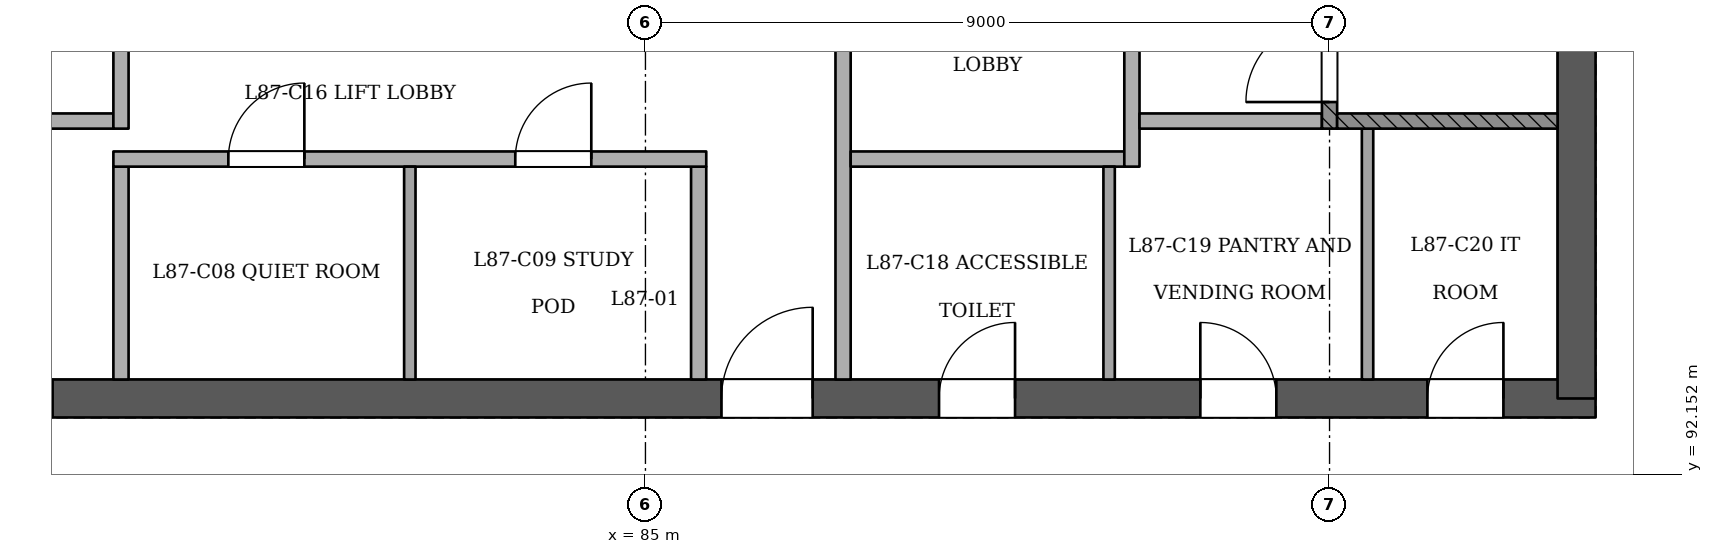
"""IFC4 building model, lengths in metres.
Left out: names, types, materials, properties, quantities, classifications, styles, units other than length and angle.
Written with IfcOpenShell. Run it as: python <this file> out.ifc"""

import sys

from ifc_helpers import new_model, si_unit, direction, frame, frame_2d, origin, place, context, subcontext, project, spatial, rectangle, extrude, element, fill, save


model = new_model("IFC4")
c1 = context("Model", 3, precision=1e-05, world=origin(), true_north=direction((0.0, 1.0)))
c2 = subcontext(c1, "Body", "Model", "MODEL_VIEW")
j1 = project(units=[si_unit("LENGTHUNIT", "METRE"), si_unit("PLANEANGLEUNIT", "RADIAN")], contexts=[c1])
p1 = place(None, origin())
s1 = spatial("IfcSite", under=j1, at=p1, CompositionType="ELEMENT")
p2 = place(p1, origin())
s2 = spatial("IfcBuilding", under=s1, at=p2, CompositionType="ELEMENT")
p3 = place(p2, frame((0.0, 0.0, 334.6)))
s3 = spatial("IfcBuildingStorey", under=s2, at=p3, CompositionType="ELEMENT", Elevation=334.6)
p4 = place(p3, frame((72.75, 93.15, 0.0), z_axis=(0.0, 0.0, 1.0), x_axis=(1.0, 0.0, 0.0)))
e1 = element("IfcWall", 1, at=p4, inside=s3, PredefinedType="SHEAR", context=c2, shape_type="SweptSolid", body=[
    extrude(rectangle(XDim=24.75, YDim=0.5, at=frame_2d((12.375, 0.0))), origin(), (0.0, 0.0, 1.0), 4.2),
])
p5 = place(p4, frame((1.05, 0.0, 0.0)))
e2 = element("IfcOpeningElement", 2, at=p5, cuts=e1, PredefinedType="OPENING", context=c2, shape_type="SweptSolid", body=[
    extrude(rectangle(XDim=1.2, YDim=2.1, at=frame_2d((0.6, 1.05))), frame((0.0, 0.26, 0.0), z_axis=(0.0, -1.0, 0.0), x_axis=(1.0, 0.0, 0.0)), (0.0, 0.0, 1.0), 0.521),
])
p6 = place(p4, frame((3.25, 0.0, 0.0)))
e3 = element("IfcOpeningElement", 3, at=p6, cuts=e1, PredefinedType="OPENING", context=c2, shape_type="SweptSolid", body=[
    extrude(rectangle(XDim=1.2, YDim=2.1, at=frame_2d((0.6, 1.05))), frame((0.0, 0.26, 0.0), z_axis=(0.0, -1.0, 0.0), x_axis=(1.0, 0.0, 0.0)), (0.0, 0.0, 1.0), 0.521),
])
p7 = place(p4, frame((13.25, 0.0, 0.0)))
e4 = element("IfcOpeningElement", 4, at=p7, cuts=e1, PredefinedType="OPENING", context=c2, shape_type="SweptSolid", body=[
    extrude(rectangle(XDim=1.2, YDim=2.1, at=frame_2d((0.6, 1.05))), frame((0.0, 0.26, 0.0), z_axis=(0.0, -1.0, 0.0), x_axis=(1.0, 0.0, 0.0)), (0.0, 0.0, 1.0), 0.521),
])
p8 = place(p4, frame((16.113, 0.0, 0.0)))
e5 = element("IfcOpeningElement", 5, at=p8, cuts=e1, PredefinedType="OPENING", context=c2, shape_type="SweptSolid", body=[
    extrude(rectangle(XDim=1.0, YDim=2.1, at=frame_2d((0.5, 1.05))), frame((0.0, 0.26, 0.0), z_axis=(0.0, -1.0, 0.0), x_axis=(1.0, 0.0, 0.0)), (0.0, 0.0, 1.0), 0.521),
])
p9 = place(p4, frame((19.55, 0.0, 0.0)))
e6 = element("IfcOpeningElement", 6, at=p9, cuts=e1, PredefinedType="OPENING", context=c2, shape_type="SweptSolid", body=[
    extrude(rectangle(XDim=1.0, YDim=2.1, at=frame_2d((0.5, 1.05))), frame((0.0, 0.26, 0.0), z_axis=(0.0, -1.0, 0.0), x_axis=(1.0, 0.0, 0.0)), (0.0, 0.0, 1.0), 0.521),
])
p10 = place(p4, frame((22.538, 0.0, 0.0)))
e7 = element("IfcOpeningElement", 7, at=p10, cuts=e1, PredefinedType="OPENING", context=c2, shape_type="SweptSolid", body=[
    extrude(rectangle(XDim=1.0, YDim=2.1, at=frame_2d((0.5, 1.05))), frame((0.0, 0.26, 0.0), z_axis=(0.0, -1.0, 0.0), x_axis=(1.0, 0.0, 0.0)), (0.0, 0.0, 1.0), 0.521),
])
p11 = place(p3, frame((97.25, 93.15, 0.0), z_axis=(0.0, 0.0, 1.0), x_axis=(0.0, 1.0, 0.0)))
e8 = element("IfcWall", 8, at=p11, inside=s3, PredefinedType="SHEAR", context=c2, shape_type="SweptSolid", body=[
    extrude(rectangle(XDim=10.75, YDim=0.5, at=frame_2d((5.375, 0.0))), origin(), (0.0, 0.0, 1.0), 4.2),
])
p12 = place(p3, frame((78.1, 93.4, 0.0), z_axis=(0.0, 0.0, 1.0), x_axis=(0.0, 1.0, 0.0)))
e9 = element("IfcWall", 9, at=p12, inside=s3, PredefinedType="PARTITIONING", context=c2, shape_type="SweptSolid", body=[
    extrude(rectangle(XDim=2.8, YDim=0.2, at=frame_2d((1.4, 0.0))), origin(), (0.0, 0.0, 1.0), 3.9),
])
p13 = place(p3, frame((81.9, 93.4, 0.0), z_axis=(0.0, 0.0, 1.0), x_axis=(0.0, 1.0, 0.0)))
e10 = element("IfcWall", 10, at=p13, inside=s3, PredefinedType="PARTITIONING", context=c2, shape_type="SweptSolid", body=[
    extrude(rectangle(XDim=2.8, YDim=0.15, at=frame_2d((1.4, 0.0))), origin(), (0.0, 0.0, 1.0), 3.9),
])
p14 = place(p3, frame((85.7, 93.4, 0.0), z_axis=(0.0, 0.0, 1.0), x_axis=(0.0, 1.0, 0.0)))
e11 = element("IfcWall", 11, at=p14, inside=s3, PredefinedType="PARTITIONING", context=c2, shape_type="SweptSolid", body=[
    extrude(rectangle(XDim=2.8, YDim=0.2, at=frame_2d((1.4, 0.0))), origin(), (0.0, 0.0, 1.0), 3.9),
])
p15 = place(p3, frame((87.6, 93.4, 0.0), z_axis=(0.0, 0.0, 1.0), x_axis=(0.0, 1.0, 0.0)))
e12 = element("IfcWall", 12, at=p15, inside=s3, PredefinedType="PARTITIONING", context=c2, shape_type="SweptSolid", body=[
    extrude(rectangle(XDim=7.0, YDim=0.2, at=frame_2d((3.5, 0.0))), origin(), (0.0, 0.0, 1.0), 3.9),
])
p16 = place(p15, frame((4.45, 0.0, 0.0)))
e13 = element("IfcOpeningElement", 13, at=p16, cuts=e12, PredefinedType="OPENING", context=c2, shape_type="SweptSolid", body=[
    extrude(rectangle(XDim=1.1, YDim=2.1, at=frame_2d((0.55, 1.05))), frame((0.0, 0.11, 0.0), z_axis=(0.0, -1.0, 0.0), x_axis=(1.0, 0.0, 0.0)), (0.0, 0.0, 1.0), 0.221),
])
p17 = place(p3, frame((91.1, 93.4, 0.0), z_axis=(0.0, 0.0, 1.0), x_axis=(0.0, 1.0, 0.0)))
e14 = element("IfcWall", 14, at=p17, inside=s3, PredefinedType="PARTITIONING", context=c2, shape_type="SweptSolid", body=[
    extrude(rectangle(XDim=2.8, YDim=0.15, at=frame_2d((1.4, 0.0))), origin(), (0.0, 0.0, 1.0), 3.9),
])
p18 = place(p3, frame((94.5, 93.4, 0.0), z_axis=(0.0, 0.0, 1.0), x_axis=(0.0, 1.0, 0.0)))
e15 = element("IfcWall", 15, at=p18, inside=s3, PredefinedType="PARTITIONING", context=c2, shape_type="SweptSolid", body=[
    extrude(rectangle(XDim=3.3, YDim=0.15, at=frame_2d((1.65, 0.0))), origin(), (0.0, 0.0, 1.0), 3.9),
])
p19 = place(p3, frame((78.0, 96.3, 0.0), z_axis=(0.0, 0.0, 1.0), x_axis=(1.0, 0.0, 0.0)))
e16 = element("IfcWall", 16, at=p19, inside=s3, PredefinedType="PARTITIONING", context=c2, shape_type="SweptSolid", body=[
    extrude(rectangle(XDim=7.8, YDim=0.2, at=frame_2d((3.9, 0.0))), origin(), (0.0, 0.0, 1.0), 3.9),
])
p20 = place(p19, frame((1.512, 0.0, 0.0)))
e17 = element("IfcOpeningElement", 17, at=p20, cuts=e16, PredefinedType="OPENING", context=c2, shape_type="SweptSolid", body=[
    extrude(rectangle(XDim=1.0, YDim=2.1, at=frame_2d((0.5, 1.05))), frame((0.0, 0.11, 0.0), z_axis=(0.0, -1.0, 0.0), x_axis=(1.0, 0.0, 0.0)), (0.0, 0.0, 1.0), 0.221),
])
p21 = place(p19, frame((5.288, 0.0, 0.0)))
e18 = element("IfcOpeningElement", 18, at=p21, cuts=e16, PredefinedType="OPENING", context=c2, shape_type="SweptSolid", body=[
    extrude(rectangle(XDim=1.0, YDim=2.1, at=frame_2d((0.5, 1.05))), frame((0.0, 0.11, 0.0), z_axis=(0.0, -1.0, 0.0), x_axis=(1.0, 0.0, 0.0)), (0.0, 0.0, 1.0), 0.221),
])
p22 = place(p3, frame((87.7, 96.3, 0.0), z_axis=(0.0, 0.0, 1.0), x_axis=(1.0, 0.0, 0.0)))
e19 = element("IfcWall", 19, at=p22, inside=s3, PredefinedType="PARTITIONING", context=c2, shape_type="SweptSolid", body=[
    extrude(rectangle(XDim=3.6, YDim=0.2, at=frame_2d((1.8, 0.0))), origin(), (0.0, 0.0, 1.0), 3.9),
])
p23 = place(p3, frame((91.4, 96.2, 0.0), z_axis=(0.0, 0.0, 1.0), x_axis=(0.0, 1.0, 0.0)))
e20 = element("IfcWall", 20, at=p23, inside=s3, PredefinedType="PARTITIONING", context=c2, shape_type="SweptSolid", body=[
    extrude(rectangle(XDim=4.2, YDim=0.2, at=frame_2d((2.1, 0.0))), origin(), (0.0, 0.0, 1.0), 3.9),
])
p24 = place(p23, frame((2.45, 0.0, 0.0)))
e21 = element("IfcOpeningElement", 21, at=p24, cuts=e20, PredefinedType="OPENING", context=c2, shape_type="SweptSolid", body=[
    extrude(rectangle(XDim=1.1, YDim=2.1, at=frame_2d((0.55, 1.05))), frame((0.0, 0.11, 0.0), z_axis=(0.0, -1.0, 0.0), x_axis=(1.0, 0.0, 0.0)), (0.0, 0.0, 1.0), 0.221),
])
p25 = place(p3, frame((76.1, 96.8, 0.0), z_axis=(0.0, 0.0, 1.0), x_axis=(1.0, 0.0, 0.0)))
e22 = element("IfcWall", 22, at=p25, inside=s3, PredefinedType="PARTITIONING", context=c2, shape_type="SweptSolid", body=[
    extrude(rectangle(XDim=1.9, YDim=0.2, at=frame_2d((0.95, 0.0))), origin(), (0.0, 0.0, 1.0), 3.9),
])
p26 = place(p3, frame((78.1, 96.7, 0.0), z_axis=(0.0, 0.0, 1.0), x_axis=(0.0, 1.0, 0.0)))
e23 = element("IfcWall", 23, at=p26, inside=s3, PredefinedType="PARTITIONING", context=c2, shape_type="SweptSolid", body=[
    extrude(rectangle(XDim=3.7, YDim=0.2, at=frame_2d((1.85, 0.0))), origin(), (0.0, 0.0, 1.0), 3.9),
])
p27 = place(p26, frame((1.95, 0.0, 0.0)))
e24 = element("IfcOpeningElement", 24, at=p27, cuts=e23, PredefinedType="OPENING", context=c2, shape_type="SweptSolid", body=[
    extrude(rectangle(XDim=1.1, YDim=2.1, at=frame_2d((0.55, 1.05))), frame((0.0, 0.11, 0.0), z_axis=(0.0, -1.0, 0.0), x_axis=(1.0, 0.0, 0.0)), (0.0, 0.0, 1.0), 0.221),
])
p28 = place(p3, frame((91.5, 96.8, 0.0), z_axis=(0.0, 0.0, 1.0), x_axis=(1.0, 0.0, 0.0)))
e25 = element("IfcWall", 25, at=p28, inside=s3, PredefinedType="PARTITIONING", context=c2, shape_type="SweptSolid", body=[
    extrude(rectangle(XDim=2.4, YDim=0.2, at=frame_2d((1.2, 0.0))), origin(), (0.0, 0.0, 1.0), 3.9),
])
p29 = place(p3, frame((94.0, 96.7, 0.0), z_axis=(0.0, 0.0, 1.0), x_axis=(0.0, 1.0, 0.0)))
e26 = element("IfcWall", 26, at=p29, inside=s3, PredefinedType="SOLIDWALL", context=c2, shape_type="SweptSolid", body=[
    extrude(rectangle(XDim=3.7, YDim=0.2, at=frame_2d((1.85, 0.0))), origin(), (0.0, 0.0, 1.0), 3.9),
])
p30 = place(p29, frame((0.35, 0.0, 0.0)))
e27 = element("IfcOpeningElement", 27, at=p30, cuts=e26, PredefinedType="OPENING", context=c2, shape_type="SweptSolid", body=[
    extrude(rectangle(XDim=1.1, YDim=2.1, at=frame_2d((0.55, 1.05))), frame((0.0, 0.11, 0.0), z_axis=(0.0, -1.0, 0.0), x_axis=(1.0, 0.0, 0.0)), (0.0, 0.0, 1.0), 0.221),
])
p31 = place(p3, frame((94.1, 96.8, 0.0), z_axis=(0.0, 0.0, 1.0), x_axis=(1.0, 0.0, 0.0)))
e28 = element("IfcWall", 28, at=p31, inside=s3, PredefinedType="SOLIDWALL", context=c2, shape_type="SweptSolid", body=[
    extrude(rectangle(XDim=2.9, YDim=0.2, at=frame_2d((1.45, 0.0))), origin(), (0.0, 0.0, 1.0), 3.9),
])
p32 = place(p30, origin())
e29 = element("IfcDoor", 29, at=p32, inside=s3, OperationType="SINGLE_SWING_LEFT", PredefinedType="NOTDEFINED", context=c2, shape_type="SweptSolid", body=[
    extrude(rectangle(XDim=1.1, YDim=2.1, at=frame_2d((0.55, 1.05))), frame((0.0, 0.025, 0.0), z_axis=(0.0, -1.0, 0.0), x_axis=(1.0, 0.0, 0.0)), (0.0, 0.0, 1.0), 0.05),
])
fill(e27, e29)
p33 = place(p6, origin())
e30 = element("IfcDoor", 30, at=p33, inside=s3, OperationType="SINGLE_SWING_LEFT", PredefinedType="NOTDEFINED", context=c2, shape_type="SweptSolid", body=[
    extrude(rectangle(XDim=1.2, YDim=2.1, at=frame_2d((0.6, 1.05))), frame((0.0, 0.025, 0.0), z_axis=(0.0, -1.0, 0.0), x_axis=(1.0, 0.0, 0.0)), (0.0, 0.0, 1.0), 0.05),
])
fill(e3, e30)
p34 = place(p7, origin())
e31 = element("IfcDoor", 31, at=p34, inside=s3, OperationType="SINGLE_SWING_RIGHT", PredefinedType="NOTDEFINED", context=c2, shape_type="SweptSolid", body=[
    extrude(rectangle(XDim=1.2, YDim=2.1, at=frame_2d((0.6, 1.05))), frame((0.0, 0.025, 0.0), z_axis=(0.0, -1.0, 0.0), x_axis=(1.0, 0.0, 0.0)), (0.0, 0.0, 1.0), 0.05),
])
fill(e4, e31)
p35 = place(p8, origin())
e32 = element("IfcDoor", 32, at=p35, inside=s3, OperationType="SINGLE_SWING_RIGHT", PredefinedType="NOTDEFINED", context=c2, shape_type="SweptSolid", body=[
    extrude(rectangle(XDim=1.0, YDim=2.1, at=frame_2d((0.5, 1.05))), frame((0.0, 0.025, 0.0), z_axis=(0.0, -1.0, 0.0), x_axis=(1.0, 0.0, 0.0)), (0.0, 0.0, 1.0), 0.05),
])
fill(e5, e32)
p36 = place(p9, origin())
e33 = element("IfcDoor", 33, at=p36, inside=s3, OperationType="SINGLE_SWING_LEFT", PredefinedType="NOTDEFINED", context=c2, shape_type="SweptSolid", body=[
    extrude(rectangle(XDim=1.0, YDim=2.1, at=frame_2d((0.5, 1.05))), frame((0.0, 0.025, 0.0), z_axis=(0.0, -1.0, 0.0), x_axis=(1.0, 0.0, 0.0)), (0.0, 0.0, 1.0), 0.05),
])
fill(e6, e33)
p37 = place(p10, origin())
e34 = element("IfcDoor", 34, at=p37, inside=s3, OperationType="SINGLE_SWING_RIGHT", PredefinedType="NOTDEFINED", context=c2, shape_type="SweptSolid", body=[
    extrude(rectangle(XDim=1.0, YDim=2.1, at=frame_2d((0.5, 1.05))), frame((0.0, 0.025, 0.0), z_axis=(0.0, -1.0, 0.0), x_axis=(1.0, 0.0, 0.0)), (0.0, 0.0, 1.0), 0.05),
])
fill(e7, e34)
p38 = place(p20, origin())
e35 = element("IfcDoor", 35, at=p38, inside=s3, OperationType="SINGLE_SWING_RIGHT", PredefinedType="NOTDEFINED", context=c2, shape_type="SweptSolid", body=[
    extrude(rectangle(XDim=1.0, YDim=2.1, at=frame_2d((0.5, 1.05))), frame((0.0, 0.025, 0.0), z_axis=(0.0, -1.0, 0.0), x_axis=(1.0, 0.0, 0.0)), (0.0, 0.0, 1.0), 0.05),
])
fill(e17, e35)
p39 = place(p21, origin())
e36 = element("IfcDoor", 36, at=p39, inside=s3, OperationType="SINGLE_SWING_RIGHT", PredefinedType="NOTDEFINED", context=c2, shape_type="SweptSolid", body=[
    extrude(rectangle(XDim=1.0, YDim=2.1, at=frame_2d((0.5, 1.05))), frame((0.0, 0.025, 0.0), z_axis=(0.0, -1.0, 0.0), x_axis=(1.0, 0.0, 0.0)), (0.0, 0.0, 1.0), 0.05),
])
fill(e18, e36)
save(model, sys.argv[1])
